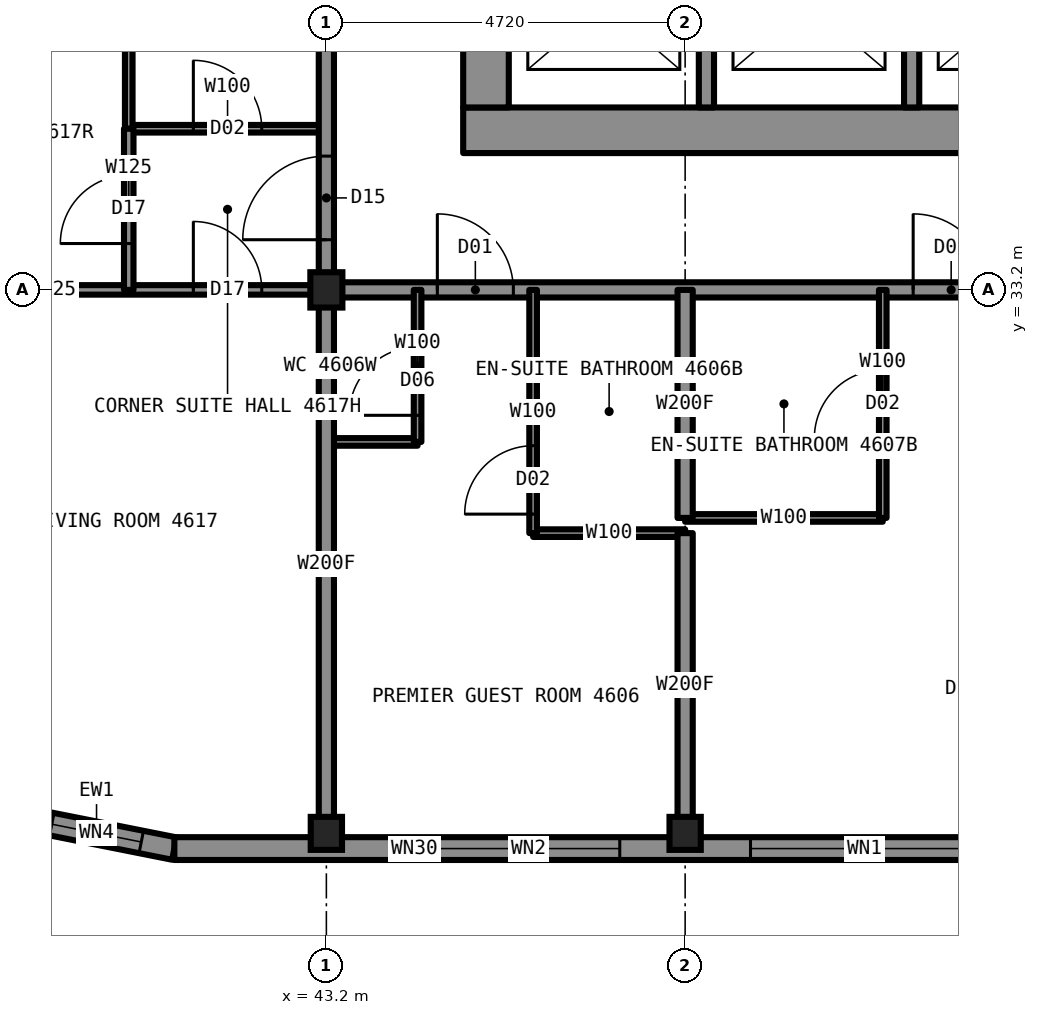
"""IFC4 building model, lengths in metres.
Left out: names, types, materials, properties, quantities, classifications, styles, units other than length and angle.
Written with IfcOpenShell. Run it as: python <this file> out.ifc"""

import sys

from ifc_helpers import new_model, si_unit, direction, frame, frame_2d, origin, origin_2d, place, context, subcontext, project, spatial, rectangle, i_section, extrude, element, fill, save


model = new_model("IFC4")
c1 = context("Model", 3, precision=1e-05, world=origin(), true_north=direction((0.0, 1.0)))
c2 = subcontext(c1, "Body", "Model", "MODEL_VIEW")
j1 = project(units=[si_unit("LENGTHUNIT", "METRE"), si_unit("PLANEANGLEUNIT", "RADIAN")], contexts=[c1])
p1 = place(None, origin())
s1 = spatial("IfcSite", under=j1, at=p1, CompositionType="ELEMENT")
p2 = place(p1, origin())
s2 = spatial("IfcBuilding", under=s1, at=p2, CompositionType="ELEMENT")
p3 = place(p2, frame((0.0, 0.0, 172.3)))
s3 = spatial("IfcBuildingStorey", under=s2, at=p3, CompositionType="ELEMENT", Elevation=172.3)
for number, where, z_axis, x_axis in (
    (1, (43.2, 26.05, 0.0), (0.0, 0.0, 1.0), (1.0, 0.0, 0.0)),
    (2, (47.92, 26.05, 0.0), (0.0, 0.0, 1.0), (1.0, 0.0, 0.0)),
):
    element("IfcColumn", number, at=place(p3, frame(where, z_axis=z_axis, x_axis=x_axis)), inside=s3, PredefinedType="COLUMN", context=c2, shape_type="SweptSolid", body=[
        extrude(i_section(OverallWidth=0.411, OverallDepth=0.434, WebThickness=0.036, FlangeThickness=0.057, at=origin_2d()), origin(), (0.0, 0.0, 1.0), 3.5),
    ])
p4 = place(p3, frame((43.2, 33.2, 0.0), z_axis=(0.0, 0.0, 1.0), x_axis=(1.0, 0.0, 0.0)))
e3 = element("IfcColumn", 3, at=p4, inside=s3, PredefinedType="COLUMN", context=c2, shape_type="SweptSolid", body=[
    extrude(i_section(OverallWidth=0.422, OverallDepth=0.465, WebThickness=0.045, FlangeThickness=0.073, at=origin_2d()), origin(), (0.0, 0.0, 1.0), 3.5),
])
p5 = place(p3, frame((45.0, 35.3, 0.0), z_axis=(0.0, 0.0, 1.0), x_axis=(1.0, 0.0, 0.0)))
e4 = element("IfcWall", 4, at=p5, inside=s3, PredefinedType="SHEAR", context=c2, shape_type="SweptSolid", body=[
    extrude(rectangle(XDim=20.0, YDim=0.6, at=frame_2d((10.0, 0.0))), origin(), (0.0, 0.0, 1.0), 3.5),
])
p6 = place(p3, frame((45.3, 35.6, 0.0), z_axis=(0.0, 0.0, 1.0), x_axis=(0.0, 1.0, 0.0)))
e5 = element("IfcWall", 5, at=p6, inside=s3, PredefinedType="SHEAR", context=c2, shape_type="SweptSolid", body=[
    extrude(rectangle(XDim=18.8, YDim=0.6, at=frame_2d((9.4, 0.0))), origin(), (0.0, 0.0, 1.0), 3.5),
])
p7 = place(p6, frame((13.4, 0.0, 0.0)))
e6 = element("IfcOpeningElement", 6, at=p7, cuts=e5, PredefinedType="OPENING", context=c2, shape_type="SweptSolid", body=[
    extrude(rectangle(XDim=1.8, YDim=2.2, at=frame_2d((0.9, 1.1))), frame((0.0, 0.31, 0.0), z_axis=(0.0, -1.0, 0.0), x_axis=(1.0, 0.0, 0.0)), (0.0, 0.0, 1.0), 0.62),
])
p8 = place(p6, frame((3.6, 0.0, 0.0)))
e7 = element("IfcOpeningElement", 7, at=p8, cuts=e5, PredefinedType="OPENING", context=c2, shape_type="SweptSolid", body=[
    extrude(rectangle(XDim=1.8, YDim=2.2, at=frame_2d((0.9, 1.1))), frame((0.0, 0.31, 0.0), z_axis=(0.0, -1.0, 0.0), x_axis=(1.0, 0.0, 0.0)), (0.0, 0.0, 1.0), 0.62),
])
p9 = place(p6, frame((6.4, 0.0, 0.0)))
e8 = element("IfcOpeningElement", 8, at=p9, cuts=e5, PredefinedType="OPENING", context=c2, shape_type="SweptSolid", body=[
    extrude(rectangle(XDim=1.2, YDim=2.2, at=frame_2d((0.6, 1.1))), frame((0.0, 0.31, 0.0), z_axis=(0.0, -1.0, 0.0), x_axis=(1.0, 0.0, 0.0)), (0.0, 0.0, 1.0), 0.62),
])
p10 = place(p3, frame((43.2, 33.2, 0.0), z_axis=(0.0, 0.0, 1.0), x_axis=(1.0, 0.0, 0.0)))
e9 = element("IfcWall", 9, at=p10, inside=s3, PredefinedType="PARTITIONING", context=c2, shape_type="SweptSolid", body=[
    extrude(rectangle(XDim=23.6, YDim=0.2, at=frame_2d((11.8, 0.0))), origin(), (0.0, 0.0, 1.0), 3.33),
])
p11 = place(p10, frame((1.46, 0.0, 0.0)))
e10 = element("IfcOpeningElement", 10, at=p11, cuts=e9, PredefinedType="OPENING", context=c2, shape_type="SweptSolid", body=[
    extrude(rectangle(XDim=1.0, YDim=2.2, at=frame_2d((0.5, 1.1))), frame((0.0, 0.11, 0.0), z_axis=(0.0, -1.0, 0.0), x_axis=(1.0, 0.0, 0.0)), (0.0, 0.0, 1.0), 0.22),
])
p12 = place(p10, frame((7.72, 0.0, 0.0)))
e11 = element("IfcOpeningElement", 11, at=p12, cuts=e9, PredefinedType="OPENING", context=c2, shape_type="SweptSolid", body=[
    extrude(rectangle(XDim=1.0, YDim=2.2, at=frame_2d((0.5, 1.1))), frame((0.0, 0.11, 0.0), z_axis=(0.0, -1.0, 0.0), x_axis=(1.0, 0.0, 0.0)), (0.0, 0.0, 1.0), 0.22),
])
p13 = place(p10, frame((17.16, 0.0, 0.0)))
e12 = element("IfcOpeningElement", 12, at=p13, cuts=e9, PredefinedType="OPENING", context=c2, shape_type="SweptSolid", body=[
    extrude(rectangle(XDim=1.0, YDim=2.2, at=frame_2d((0.5, 1.1))), frame((0.0, 0.11, 0.0), z_axis=(0.0, -1.0, 0.0), x_axis=(1.0, 0.0, 0.0)), (0.0, 0.0, 1.0), 0.22),
])
p14 = place(p3, frame((36.0, 33.2, 0.0), z_axis=(0.0, 0.0, 1.0), x_axis=(1.0, 0.0, 0.0)))
e13 = element("IfcWall", 13, at=p14, inside=s3, PredefinedType="PARTITIONING", context=c2, shape_type="SweptSolid", body=[
    extrude(rectangle(XDim=7.2, YDim=0.125, at=frame_2d((3.6, 0.0))), origin(), (0.0, 0.0, 1.0), 2.573),
])
p15 = place(p14, frame((5.45, 0.0, 0.0)))
e14 = element("IfcOpeningElement", 14, at=p15, cuts=e13, PredefinedType="OPENING", context=c2, shape_type="SweptSolid", body=[
    extrude(rectangle(XDim=0.9, YDim=2.2, at=frame_2d((0.45, 1.1))), frame((0.0, 0.073, 0.0), z_axis=(0.0, -1.0, 0.0), x_axis=(1.0, 0.0, 0.0)), (0.0, 0.0, 1.0), 0.145),
])
p16 = place(p3, frame((43.2, 31.2, 0.0), z_axis=(0.0, 0.0, 1.0), x_axis=(1.0, 0.0, 0.0)))
e15 = element("IfcWall", 15, at=p16, inside=s3, PredefinedType="PARTITIONING", context=c2, shape_type="SweptSolid", body=[
    extrude(rectangle(XDim=1.2, YDim=0.1, at=frame_2d((0.6, 0.0))), origin(), (0.0, 0.0, 1.0), 3.33),
])
p17 = place(p3, frame((47.92, 30.2, 0.0), z_axis=(0.0, 0.0, 1.0), x_axis=(1.0, 0.0, 0.0)))
e16 = element("IfcWall", 16, at=p17, inside=s3, PredefinedType="PARTITIONING", context=c2, shape_type="SweptSolid", body=[
    extrude(rectangle(XDim=2.6, YDim=0.1, at=frame_2d((1.3, 0.0))), origin(), (0.0, 0.0, 1.0), 3.33),
])
p18 = place(p3, frame((45.92, 30.0, 0.0), z_axis=(0.0, 0.0, 1.0), x_axis=(1.0, 0.0, 0.0)))
e17 = element("IfcWall", 17, at=p18, inside=s3, PredefinedType="PARTITIONING", context=c2, shape_type="SweptSolid", body=[
    extrude(rectangle(XDim=2.0, YDim=0.1, at=frame_2d((1.0, 0.0))), origin(), (0.0, 0.0, 1.0), 3.33),
])
p19 = place(p3, frame((40.6, 35.32, 0.0), z_axis=(0.0, 0.0, 1.0), x_axis=(1.0, 0.0, 0.0)))
e18 = element("IfcWall", 18, at=p19, inside=s3, PredefinedType="PARTITIONING", context=c2, shape_type="SweptSolid", body=[
    extrude(rectangle(XDim=2.6, YDim=0.1, at=frame_2d((1.3, 0.0))), origin(), (0.0, 0.0, 1.0), 3.33),
])
p20 = place(p19, frame((0.85, 0.0, 0.0)))
e19 = element("IfcOpeningElement", 19, at=p20, cuts=e18, PredefinedType="OPENING", context=c2, shape_type="SweptSolid", body=[
    extrude(rectangle(XDim=0.9, YDim=2.1, at=frame_2d((0.45, 1.05))), frame((0.0, 0.06, 0.0), z_axis=(0.0, -1.0, 0.0), x_axis=(1.0, 0.0, 0.0)), (0.0, 0.0, 1.0), 0.12),
])
p21 = place(p3, frame((44.4, 31.2, 0.0), z_axis=(0.0, 0.0, 1.0), x_axis=(0.0, 1.0, 0.0)))
e20 = element("IfcWall", 20, at=p21, inside=s3, PredefinedType="PARTITIONING", context=c2, shape_type="SweptSolid", body=[
    extrude(rectangle(XDim=2.0, YDim=0.1, at=frame_2d((1.0, 0.0))), origin(), (0.0, 0.0, 1.0), 3.33),
])
p22 = place(p21, frame((0.35, 0.0, 0.0)))
e21 = element("IfcOpeningElement", 21, at=p22, cuts=e20, PredefinedType="OPENING", context=c2, shape_type="SweptSolid", body=[
    extrude(rectangle(XDim=0.9, YDim=2.1, at=frame_2d((0.45, 1.05))), frame((0.0, 0.06, 0.0), z_axis=(0.0, -1.0, 0.0), x_axis=(1.0, 0.0, 0.0)), (0.0, 0.0, 1.0), 0.12),
])
p23 = place(p3, frame((43.2, 33.2, 0.0), z_axis=(0.0, 0.0, 1.0), x_axis=(0.0, 1.0, 0.0)))
e22 = element("IfcWall", 22, at=p23, inside=s3, PredefinedType="PARTITIONING", context=c2, shape_type="SweptSolid", body=[
    extrude(rectangle(XDim=23.58, YDim=0.2, at=frame_2d((11.79, 0.0))), origin(), (0.0, 0.0, 1.0), 3.33),
])
p24 = place(p23, frame((6.18, 0.0, 0.0)))
e23 = element("IfcOpeningElement", 23, at=p24, cuts=e22, PredefinedType="OPENING", context=c2, shape_type="SweptSolid", body=[
    extrude(rectangle(XDim=1.0, YDim=2.2, at=frame_2d((0.5, 1.1))), frame((0.0, 0.11, 0.0), z_axis=(0.0, -1.0, 0.0), x_axis=(1.0, 0.0, 0.0)), (0.0, 0.0, 1.0), 0.22),
])
p25 = place(p23, frame((9.84, 0.0, 0.0)))
e24 = element("IfcOpeningElement", 24, at=p25, cuts=e22, PredefinedType="OPENING", context=c2, shape_type="SweptSolid", body=[
    extrude(rectangle(XDim=1.0, YDim=2.2, at=frame_2d((0.5, 1.1))), frame((0.0, 0.11, 0.0), z_axis=(0.0, -1.0, 0.0), x_axis=(1.0, 0.0, 0.0)), (0.0, 0.0, 1.0), 0.22),
])
p26 = place(p23, frame((14.56, 0.0, 0.0)))
e25 = element("IfcOpeningElement", 25, at=p26, cuts=e22, PredefinedType="OPENING", context=c2, shape_type="SweptSolid", body=[
    extrude(rectangle(XDim=1.0, YDim=2.2, at=frame_2d((0.5, 1.1))), frame((0.0, 0.11, 0.0), z_axis=(0.0, -1.0, 0.0), x_axis=(1.0, 0.0, 0.0)), (0.0, 0.0, 1.0), 0.22),
])
p27 = place(p23, frame((22.05, 0.0, 0.0)))
e26 = element("IfcOpeningElement", 26, at=p27, cuts=e22, PredefinedType="OPENING", context=c2, shape_type="SweptSolid", body=[
    extrude(rectangle(XDim=1.1, YDim=2.2, at=frame_2d((0.55, 1.1))), frame((0.0, 0.11, 0.0), z_axis=(0.0, -1.0, 0.0), x_axis=(1.0, 0.0, 0.0)), (0.0, 0.0, 1.0), 0.22),
])
p28 = place(p23, frame((0.66, 0.0, 0.0)))
e27 = element("IfcOpeningElement", 27, at=p28, cuts=e22, PredefinedType="OPENING", context=c2, shape_type="SweptSolid", body=[
    extrude(rectangle(XDim=1.1, YDim=2.2, at=frame_2d((0.55, 1.1))), frame((0.0, 0.11, 0.0), z_axis=(0.0, -1.0, 0.0), x_axis=(1.0, 0.0, 0.0)), (0.0, 0.0, 1.0), 0.22),
])
p29 = place(p3, frame((43.2, 26.0, 0.0), z_axis=(0.0, 0.0, 1.0), x_axis=(0.0, 1.0, 0.0)))
e28 = element("IfcWall", 28, at=p29, inside=s3, PredefinedType="PARTITIONING", context=c2, shape_type="SweptSolid", body=[
    extrude(rectangle(XDim=7.2, YDim=0.2, at=frame_2d((3.6, 0.0))), origin(), (0.0, 0.0, 1.0), 2.573),
])
p30 = place(p3, frame((40.6, 35.32, 0.0), z_axis=(0.0, 0.0, 1.0), x_axis=(0.0, 1.0, 0.0)))
e29 = element("IfcWall", 29, at=p30, inside=s3, PredefinedType="PARTITIONING", context=c2, shape_type="SweptSolid", body=[
    extrude(rectangle(XDim=2.6, YDim=0.1, at=frame_2d((1.3, 0.0))), origin(), (0.0, 0.0, 1.0), 3.33),
])
p31 = place(p3, frame((40.6, 33.2, 0.0), z_axis=(0.0, 0.0, 1.0), x_axis=(0.0, 1.0, 0.0)))
e30 = element("IfcWall", 30, at=p31, inside=s3, PredefinedType="PARTITIONING", context=c2, shape_type="SweptSolid", body=[
    extrude(rectangle(XDim=2.12, YDim=0.125, at=frame_2d((1.06, 0.0))), origin(), (0.0, 0.0, 1.0), 3.33),
])
p32 = place(p31, frame((0.61, 0.0, 0.0)))
e31 = element("IfcOpeningElement", 31, at=p32, cuts=e30, PredefinedType="OPENING", context=c2, shape_type="SweptSolid", body=[
    extrude(rectangle(XDim=0.9, YDim=2.2, at=frame_2d((0.45, 1.1))), frame((0.0, 0.073, 0.0), z_axis=(0.0, -1.0, 0.0), x_axis=(1.0, 0.0, 0.0)), (0.0, 0.0, 1.0), 0.145),
])
p33 = place(p3, frame((50.52, 30.2, 0.0), z_axis=(0.0, 0.0, 1.0), x_axis=(0.0, 1.0, 0.0)))
e32 = element("IfcWall", 32, at=p33, inside=s3, PredefinedType="PARTITIONING", context=c2, shape_type="SweptSolid", body=[
    extrude(rectangle(XDim=3.0, YDim=0.1, at=frame_2d((1.5, 0.0))), origin(), (0.0, 0.0, 1.0), 3.33),
])
p34 = place(p33, frame((1.05, 0.0, 0.0)))
e33 = element("IfcOpeningElement", 33, at=p34, cuts=e32, PredefinedType="OPENING", context=c2, shape_type="SweptSolid", body=[
    extrude(rectangle(XDim=0.9, YDim=2.1, at=frame_2d((0.45, 1.05))), frame((0.0, 0.06, 0.0), z_axis=(0.0, -1.0, 0.0), x_axis=(1.0, 0.0, 0.0)), (0.0, 0.0, 1.0), 0.12),
])
p35 = place(p3, frame((47.92, 26.0, 0.0), z_axis=(0.0, 0.0, 1.0), x_axis=(0.0, 1.0, 0.0)))
e34 = element("IfcWall", 34, at=p35, inside=s3, PredefinedType="PARTITIONING", context=c2, shape_type="SweptSolid", body=[
    extrude(rectangle(XDim=4.0, YDim=0.2, at=frame_2d((2.0, 0.0))), origin(), (0.0, 0.0, 1.0), 2.573),
])
p36 = place(p3, frame((47.92, 30.2, 0.0), z_axis=(0.0, 0.0, 1.0), x_axis=(0.0, 1.0, 0.0)))
e35 = element("IfcWall", 35, at=p36, inside=s3, PredefinedType="PARTITIONING", context=c2, shape_type="SweptSolid", body=[
    extrude(rectangle(XDim=3.0, YDim=0.2, at=frame_2d((1.5, 0.0))), origin(), (0.0, 0.0, 1.0), 2.573),
])
p37 = place(p3, frame((45.92, 30.0, 0.0), z_axis=(0.0, 0.0, 1.0), x_axis=(0.0, 1.0, 0.0)))
e36 = element("IfcWall", 36, at=p37, inside=s3, PredefinedType="PARTITIONING", context=c2, shape_type="SweptSolid", body=[
    extrude(rectangle(XDim=3.2, YDim=0.1, at=frame_2d((1.6, 0.0))), origin(), (0.0, 0.0, 1.0), 3.33),
])
p38 = place(p37, frame((0.25, 0.0, 0.0)))
e37 = element("IfcOpeningElement", 37, at=p38, cuts=e36, PredefinedType="OPENING", context=c2, shape_type="SweptSolid", body=[
    extrude(rectangle(XDim=0.9, YDim=2.1, at=frame_2d((0.45, 1.05))), frame((0.0, 0.06, 0.0), z_axis=(0.0, -1.0, 0.0), x_axis=(1.0, 0.0, 0.0)), (0.0, 0.0, 1.0), 0.12),
])
p39 = place(p3, frame((39.153, 26.257, 0.0), z_axis=(0.0, 0.0, 1.0), x_axis=(0.980787050784, -0.195081421501, 0.0)))
e38 = element("IfcWall", 38, at=p39, inside=s3, PredefinedType="SOLIDWALL", context=c2, shape_type="SweptSolid", body=[
    extrude(rectangle(XDim=2.087, YDim=0.3, at=frame_2d((1.044, 0.0))), origin(), (0.0, 0.0, 1.0), 3.33),
])
p40 = place(p39, frame((0.444, 0.0, 0.3)))
e39 = element("IfcOpeningElement", 39, at=p40, cuts=e38, PredefinedType="OPENING", context=c2, shape_type="SweptSolid", body=[
    extrude(rectangle(XDim=1.2, YDim=2.0, at=frame_2d((0.6, 1.0))), frame((0.0, 0.16, 0.0), z_axis=(0.0, -1.0, 0.0), x_axis=(1.0, 0.0, 0.0)), (0.0, 0.0, 1.0), 0.32),
])
p41 = place(p3, frame((41.2, 25.85, 0.0), z_axis=(0.0, 0.0, 1.0), x_axis=(1.0, 0.0, 0.0)))
e40 = element("IfcWall", 40, at=p41, inside=s3, PredefinedType="SOLIDWALL", context=c2, shape_type="SweptSolid", body=[
    extrude(rectangle(XDim=27.6, YDim=0.3, at=frame_2d((13.8, 0.0))), origin(), (0.0, 0.0, 1.0), 2.83),
])
p42 = place(p41, frame((3.46, 0.0, 0.3)))
e41 = element("IfcOpeningElement", 41, at=p42, cuts=e40, PredefinedType="OPENING", context=c2, shape_type="SweptSolid", body=[
    extrude(rectangle(XDim=2.4, YDim=2.0, at=frame_2d((1.2, 1.0))), frame((0.0, 0.16, 0.0), z_axis=(0.0, -1.0, 0.0), x_axis=(1.0, 0.0, 0.0)), (0.0, 0.0, 1.0), 0.32),
])
p43 = place(p41, frame((7.58, 0.0, 0.3)))
e42 = element("IfcOpeningElement", 42, at=p43, cuts=e40, PredefinedType="OPENING", context=c2, shape_type="SweptSolid", body=[
    extrude(rectangle(XDim=3.0, YDim=2.0, at=frame_2d((1.5, 1.0))), frame((0.0, 0.16, 0.0), z_axis=(0.0, -1.0, 0.0), x_axis=(1.0, 0.0, 0.0)), (0.0, 0.0, 1.0), 0.32),
])
p44 = place(p41, frame((12.3, 0.0, 0.3)))
e43 = element("IfcOpeningElement", 43, at=p44, cuts=e40, PredefinedType="OPENING", context=c2, shape_type="SweptSolid", body=[
    extrude(rectangle(XDim=3.0, YDim=2.0, at=frame_2d((1.5, 1.0))), frame((0.0, 0.16, 0.0), z_axis=(0.0, -1.0, 0.0), x_axis=(1.0, 0.0, 0.0)), (0.0, 0.0, 1.0), 0.32),
])
p45 = place(p41, frame((17.02, 0.0, 0.3)))
e44 = element("IfcOpeningElement", 44, at=p45, cuts=e40, PredefinedType="OPENING", context=c2, shape_type="SweptSolid", body=[
    extrude(rectangle(XDim=3.0, YDim=2.0, at=frame_2d((1.5, 1.0))), frame((0.0, 0.16, 0.0), z_axis=(0.0, -1.0, 0.0), x_axis=(1.0, 0.0, 0.0)), (0.0, 0.0, 1.0), 0.32),
])
p46 = place(p41, frame((21.74, 0.0, 0.3)))
e45 = element("IfcOpeningElement", 45, at=p46, cuts=e40, PredefinedType="OPENING", context=c2, shape_type="SweptSolid", body=[
    extrude(rectangle(XDim=2.4, YDim=2.0, at=frame_2d((1.2, 1.0))), frame((0.0, 0.16, 0.0), z_axis=(0.0, -1.0, 0.0), x_axis=(1.0, 0.0, 0.0)), (0.0, 0.0, 1.0), 0.32),
])
p47 = place(p41, frame((2.86, 0.0, 0.3)))
e46 = element("IfcOpeningElement", 46, at=p47, cuts=e40, PredefinedType="OPENING", context=c2, shape_type="SweptSolid", body=[
    extrude(rectangle(XDim=0.6, YDim=1.1, at=frame_2d((0.3, 0.55))), frame((0.0, 0.16, 0.0), z_axis=(0.0, -1.0, 0.0), x_axis=(1.0, 0.0, 0.0)), (0.0, 0.0, 1.0), 0.32),
])
p48 = place(p41, frame((24.14, 0.0, 0.3)))
e47 = element("IfcOpeningElement", 47, at=p48, cuts=e40, PredefinedType="OPENING", context=c2, shape_type="SweptSolid", body=[
    extrude(rectangle(XDim=0.6, YDim=1.1, at=frame_2d((0.3, 0.55))), frame((0.0, 0.16, 0.0), z_axis=(0.0, -1.0, 0.0), x_axis=(1.0, 0.0, 0.0)), (0.0, 0.0, 1.0), 0.32),
])
for number, where, z_axis, x_axis in (
    (48, (48.2, 35.6, 0.0), (0.0, 0.0, 1.0), (0.0, 1.0, 0.0)),
    (49, (50.9, 35.6, 0.0), (0.0, 0.0, 1.0), (0.0, 1.0, 0.0)),
):
    element("IfcWall", number, at=place(p3, frame(where, z_axis=z_axis, x_axis=x_axis)), inside=s3, PredefinedType="PARTITIONING", context=c2, shape_type="SweptSolid", body=[
        extrude(rectangle(XDim=2.7, YDim=0.2, at=frame_2d((1.35, 0.0))), origin(), (0.0, 0.0, 1.0), 3.33),
    ])
p49 = place(p11, origin())
e50 = element("IfcDoor", 50, at=p49, inside=s3, OperationType="SINGLE_SWING_LEFT", PredefinedType="DOOR", context=c2, shape_type="SweptSolid", body=[
    extrude(rectangle(XDim=1.0, YDim=2.2, at=frame_2d((0.5, 1.1))), frame((0.0, 0.025, 0.0), z_axis=(0.0, -1.0, 0.0), x_axis=(1.0, 0.0, 0.0)), (0.0, 0.0, 1.0), 0.05),
])
fill(e10, e50)
p50 = place(p38, origin())
e51 = element("IfcDoor", 51, at=p50, inside=s3, OperationType="SINGLE_SWING_RIGHT", PredefinedType="DOOR", context=c2, shape_type="SweptSolid", body=[
    extrude(rectangle(XDim=0.9, YDim=2.1, at=frame_2d((0.45, 1.05))), frame((0.0, 0.025, 0.0), z_axis=(0.0, -1.0, 0.0), x_axis=(1.0, 0.0, 0.0)), (0.0, 0.0, 1.0), 0.05),
])
fill(e37, e51)
p51 = place(p22, origin())
e52 = element("IfcDoor", 52, at=p51, inside=s3, OperationType="SINGLE_SWING_LEFT", PredefinedType="DOOR", context=c2, shape_type="SweptSolid", body=[
    extrude(rectangle(XDim=0.9, YDim=2.1, at=frame_2d((0.45, 1.05))), frame((0.0, 0.025, 0.0), z_axis=(0.0, -1.0, 0.0), x_axis=(1.0, 0.0, 0.0)), (0.0, 0.0, 1.0), 0.05),
])
fill(e21, e52)
p52 = place(p12, origin())
e53 = element("IfcDoor", 53, at=p52, inside=s3, OperationType="SINGLE_SWING_LEFT", PredefinedType="DOOR", context=c2, shape_type="SweptSolid", body=[
    extrude(rectangle(XDim=1.0, YDim=2.2, at=frame_2d((0.5, 1.1))), frame((0.0, 0.025, 0.0), z_axis=(0.0, -1.0, 0.0), x_axis=(1.0, 0.0, 0.0)), (0.0, 0.0, 1.0), 0.05),
])
fill(e11, e53)
p53 = place(p34, origin())
e54 = element("IfcDoor", 54, at=p53, inside=s3, OperationType="SINGLE_SWING_RIGHT", PredefinedType="DOOR", context=c2, shape_type="SweptSolid", body=[
    extrude(rectangle(XDim=0.9, YDim=2.1, at=frame_2d((0.45, 1.05))), frame((0.0, 0.025, 0.0), z_axis=(0.0, -1.0, 0.0), x_axis=(1.0, 0.0, 0.0)), (0.0, 0.0, 1.0), 0.05),
])
fill(e33, e54)
p54 = place(p15, origin())
e55 = element("IfcDoor", 55, at=p54, inside=s3, OperationType="SINGLE_SWING_LEFT", PredefinedType="DOOR", context=c2, shape_type="SweptSolid", body=[
    extrude(rectangle(XDim=0.9, YDim=2.2, at=frame_2d((0.45, 1.1))), frame((0.0, 0.025, 0.0), z_axis=(0.0, -1.0, 0.0), x_axis=(1.0, 0.0, 0.0)), (0.0, 0.0, 1.0), 0.05),
])
fill(e14, e55)
p55 = place(p20, origin())
e56 = element("IfcDoor", 56, at=p55, inside=s3, OperationType="SINGLE_SWING_RIGHT", PredefinedType="DOOR", context=c2, shape_type="SweptSolid", body=[
    extrude(rectangle(XDim=0.9, YDim=2.1, at=frame_2d((0.45, 1.05))), frame((0.0, 0.025, 0.0), z_axis=(0.0, -1.0, 0.0), x_axis=(1.0, 0.0, 0.0)), (0.0, 0.0, 1.0), 0.05),
])
fill(e19, e56)
p56 = place(p28, origin())
e57 = element("IfcDoor", 57, at=p56, inside=s3, OperationType="SINGLE_SWING_LEFT", PredefinedType="DOOR", context=c2, shape_type="SweptSolid", body=[
    extrude(rectangle(XDim=1.1, YDim=2.2, at=frame_2d((0.55, 1.1))), frame((0.0, 0.025, 0.0), z_axis=(0.0, -1.0, 0.0), x_axis=(1.0, 0.0, 0.0)), (0.0, 0.0, 1.0), 0.05),
])
fill(e27, e57)
p57 = place(p32, origin())
e58 = element("IfcDoor", 58, at=p57, inside=s3, OperationType="SINGLE_SWING_LEFT", PredefinedType="DOOR", context=c2, shape_type="SweptSolid", body=[
    extrude(rectangle(XDim=0.9, YDim=2.2, at=frame_2d((0.45, 1.1))), frame((0.0, 0.025, 0.0), z_axis=(0.0, -1.0, 0.0), x_axis=(1.0, 0.0, 0.0)), (0.0, 0.0, 1.0), 0.05),
])
fill(e31, e58)
p58 = place(p40, origin())
e59 = element("IfcWindow", 59, at=p58, inside=s3, PartitioningType="SINGLE_PANEL", PredefinedType="WINDOW", context=c2, shape_type="SweptSolid", body=[
    extrude(rectangle(XDim=1.2, YDim=2.0, at=frame_2d((0.6, 1.0))), frame((0.0, 0.13, 0.0), z_axis=(0.0, -1.0, 0.0), x_axis=(1.0, 0.0, 0.0)), (0.0, 0.0, 1.0), 0.06),
])
fill(e39, e59)
p59 = place(p42, origin())
e60 = element("IfcWindow", 60, at=p59, inside=s3, PartitioningType="SINGLE_PANEL", PredefinedType="WINDOW", context=c2, shape_type="SweptSolid", body=[
    extrude(rectangle(XDim=2.4, YDim=2.0, at=frame_2d((1.2, 1.0))), frame((0.0, 0.13, 0.0), z_axis=(0.0, -1.0, 0.0), x_axis=(1.0, 0.0, 0.0)), (0.0, 0.0, 1.0), 0.06),
])
fill(e41, e60)
p60 = place(p43, origin())
e61 = element("IfcWindow", 61, at=p60, inside=s3, PartitioningType="SINGLE_PANEL", PredefinedType="WINDOW", context=c2, shape_type="SweptSolid", body=[
    extrude(rectangle(XDim=3.0, YDim=2.0, at=frame_2d((1.5, 1.0))), frame((0.0, 0.13, 0.0), z_axis=(0.0, -1.0, 0.0), x_axis=(1.0, 0.0, 0.0)), (0.0, 0.0, 1.0), 0.06),
])
fill(e42, e61)
p61 = place(p47, origin())
e62 = element("IfcWindow", 62, at=p61, inside=s3, PartitioningType="SINGLE_PANEL", PredefinedType="WINDOW", context=c2, shape_type="SweptSolid", body=[
    extrude(rectangle(XDim=0.6, YDim=1.1, at=frame_2d((0.3, 0.55))), frame((0.0, 0.13, 0.0), z_axis=(0.0, -1.0, 0.0), x_axis=(1.0, 0.0, 0.0)), (0.0, 0.0, 1.0), 0.06),
])
fill(e46, e62)
save(model, sys.argv[1])
